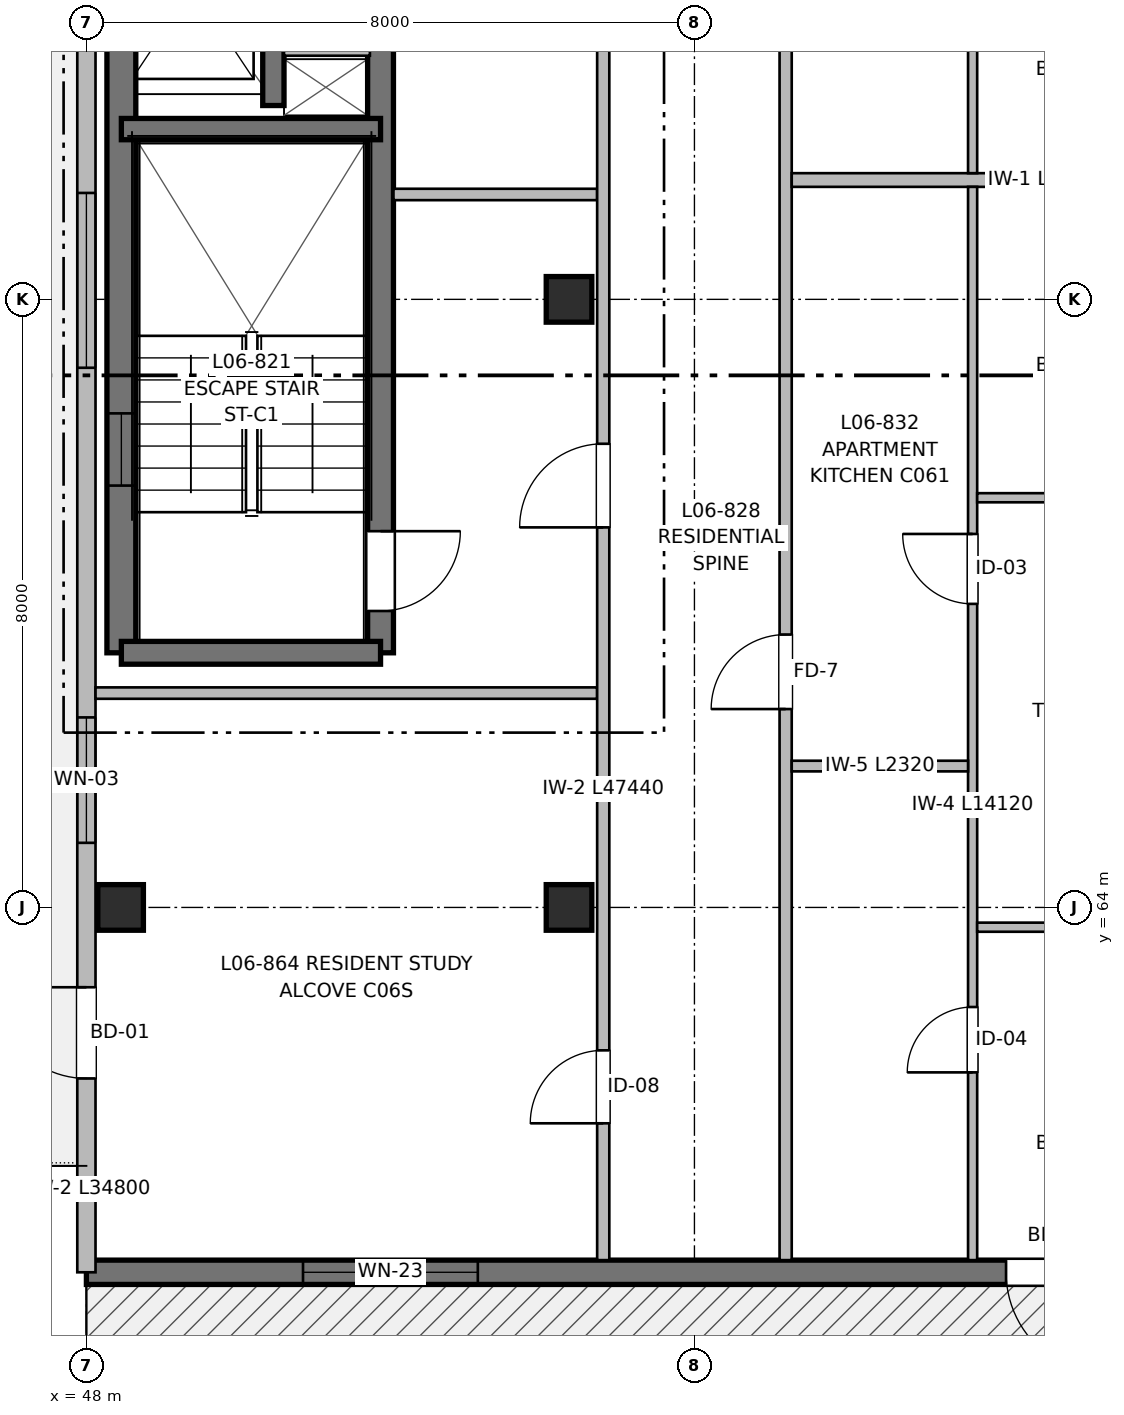
"""IFC4 building model, lengths in metres.
Left out: names, types, materials, properties, quantities, classifications, styles, units other than length and angle.
Written with IfcOpenShell. Run it as: python <this file> out.ifc"""

import sys

from ifc_helpers import new_model, si_unit, direction, frame, frame_2d, origin, origin_2d, place, context, subcontext, project, spatial, rectangle, extrude, element, fill, save


model = new_model("IFC4")
c1 = context("Model", 3, precision=1e-05, world=origin(), true_north=direction((0.0, 1.0)))
c2 = subcontext(c1, "Body", "Model", "MODEL_VIEW")
j1 = project(units=[si_unit("LENGTHUNIT", "METRE"), si_unit("PLANEANGLEUNIT", "RADIAN")], contexts=[c1])
p1 = place(None, origin())
s1 = spatial("IfcSite", under=j1, at=p1, CompositionType="ELEMENT")
p2 = place(p1, origin())
s2 = spatial("IfcBuilding", under=s1, at=p2, CompositionType="ELEMENT")
p3 = place(p2, frame((0.0, 0.0, 20.16)))
s3 = spatial("IfcBuildingStorey", under=s2, at=p3, CompositionType="ELEMENT", Elevation=20.16)
for number, where, z_axis, x_axis in (
    (1, (48.45, 64.0, 0.0), (0.0, 0.0, 1.0), (1.0, 0.0, 0.0)),
    (2, (54.35, 64.0, 0.0), (0.0, 0.0, 1.0), (1.0, 0.0, 0.0)),
    (3, (54.35, 72.0, 0.0), (0.0, 0.0, 1.0), (1.0, 0.0, 0.0)),
):
    element("IfcColumn", number, at=place(p3, frame(where, z_axis=z_axis, x_axis=x_axis)), inside=s3, PredefinedType="COLUMN", context=c2, shape_type="SweptSolid", body=[
        extrude(rectangle(XDim=0.6, YDim=0.6, at=origin_2d()), origin(), (0.0, 0.0, 1.0), 3.2),
    ])
p4 = place(p3, frame((48.46, 67.35, 0.0), z_axis=(0.0, 0.0, 1.0), x_axis=(0.0, 1.0, 0.0)))
e4 = element("IfcWall", 4, at=p4, inside=s3, PredefinedType="SHEAR", context=c2, shape_type="SweptSolid", body=[
    extrude(rectangle(XDim=12.45, YDim=0.38, at=frame_2d((6.225, 0.0))), origin(), (0.0, 0.0, 1.0), 3.2),
])
p5 = place(p4, frame((2.2, 0.0, 0.97)))
e5 = element("IfcOpeningElement", 5, at=p5, cuts=e4, PredefinedType="OPENING", context=c2, shape_type="SweptSolid", body=[
    extrude(rectangle(XDim=0.95, YDim=1.25, at=frame_2d((0.475, 0.625))), frame((0.0, 0.2, 0.0), z_axis=(0.0, -1.0, 0.0), x_axis=(1.0, 0.0, 0.0)), (0.0, 0.0, 1.0), 0.4),
])
p6 = place(p3, frame((51.87, 79.8, 0.0), z_axis=(0.0, 0.0, 1.0), x_axis=(0.0, -1.0, 0.0)))
e6 = element("IfcWall", 6, at=p6, inside=s3, PredefinedType="SHEAR", context=c2, shape_type="SweptSolid", body=[
    extrude(rectangle(XDim=12.45, YDim=0.34, at=frame_2d((6.225, 0.0))), origin(), (0.0, 0.0, 1.0), 3.2),
])
p7 = place(p6, frame((10.85, 0.0, 0.0)))
e7 = element("IfcOpeningElement", 7, at=p7, cuts=e6, PredefinedType="OPENING", context=c2, shape_type="SweptSolid", body=[
    extrude(rectangle(XDim=1.05, YDim=2.15, at=frame_2d((0.525, 1.075))), frame((0.0, 0.18, 0.0), z_axis=(0.0, -1.0, 0.0), x_axis=(1.0, 0.0, 0.0)), (0.0, 0.0, 1.0), 0.36),
])
p8 = place(p3, frame((51.87, 67.35, 0.0), z_axis=(0.0, 0.0, 1.0), x_axis=(-1.0, 0.0, 0.0)))
e8 = element("IfcWall", 8, at=p8, inside=s3, PredefinedType="SHEAR", context=c2, shape_type="SweptSolid", body=[
    extrude(rectangle(XDim=3.41, YDim=0.3, at=frame_2d((1.705, 0.0))), origin(), (0.0, 0.0, 1.0), 3.2),
])
p9 = place(p3, frame((48.46, 74.24, 0.0), z_axis=(0.0, 0.0, 1.0), x_axis=(1.0, 0.0, 0.0)))
e9 = element("IfcWall", 9, at=p9, inside=s3, PredefinedType="SHEAR", context=c2, shape_type="SweptSolid", body=[
    extrude(rectangle(XDim=3.41, YDim=0.28, at=frame_2d((1.705, 0.0))), origin(), (0.0, 0.0, 1.0), 3.2),
])
p10 = place(p3, frame((50.46, 74.55, 0.0), z_axis=(0.0, 0.0, 1.0), x_axis=(0.0, 1.0, 0.0)))
e10 = element("IfcWall", 10, at=p10, inside=s3, PredefinedType="SHEAR", context=c2, shape_type="SweptSolid", body=[
    extrude(rectangle(XDim=5.25, YDim=0.28, at=frame_2d((2.625, 0.0))), origin(), (0.0, 0.0, 1.0), 3.2),
])
p11 = place(p10, frame((1.15, 0.0, 0.0)))
e11 = element("IfcOpeningElement", 11, at=p11, cuts=e10, PredefinedType="OPENING", context=c2, shape_type="SweptSolid", body=[
    extrude(rectangle(XDim=1.0, YDim=2.15, at=frame_2d((0.5, 1.075))), frame((0.0, 0.15, 0.0), z_axis=(0.0, -1.0, 0.0), x_axis=(1.0, 0.0, 0.0)), (0.0, 0.0, 1.0), 0.3),
])
p12 = place(p10, frame((3.85, 0.0, 0.0)))
e12 = element("IfcOpeningElement", 12, at=p12, cuts=e10, PredefinedType="OPENING", context=c2, shape_type="SweptSolid", body=[
    extrude(rectangle(XDim=0.9, YDim=2.15, at=frame_2d((0.45, 1.075))), frame((0.0, 0.15, 0.0), z_axis=(0.0, -1.0, 0.0), x_axis=(1.0, 0.0, 0.0)), (0.0, 0.0, 1.0), 0.3),
])
p13 = place(p3, frame((50.6, 75.28, 0.0), z_axis=(0.0, 0.0, 1.0), x_axis=(1.0, 0.0, 0.0)))
e13 = element("IfcWall", 13, at=p13, inside=s3, PredefinedType="PARTITIONING", context=c2, shape_type="SweptSolid", body=[
    extrude(rectangle(XDim=1.13, YDim=0.15, at=frame_2d((0.565, 0.0))), origin(), (0.0, 0.0, 1.0), 2.95),
])
p14 = place(p3, frame((64.0, 59.2, 0.0), z_axis=(0.0, 0.0, 1.0), x_axis=(-1.0, 0.0, 0.0)))
e14 = element("IfcWall", 14, at=p14, inside=s3, PredefinedType="SHEAR", context=c2, shape_type="SweptSolid", body=[
    extrude(rectangle(XDim=16.0, YDim=0.32, at=frame_2d((8.0, 0.0))), origin(), (0.0, 0.0, 1.0), 2.98),
])
p15 = place(p14, frame((2.55, 0.0, 0.0)))
e15 = element("IfcOpeningElement", 15, at=p15, cuts=e14, PredefinedType="OPENING", context=c2, shape_type="SweptSolid", body=[
    extrude(rectangle(XDim=1.35, YDim=2.2, at=frame_2d((0.675, 1.1))), frame((0.0, 0.17, 0.0), z_axis=(0.0, -1.0, 0.0), x_axis=(1.0, 0.0, 0.0)), (0.0, 0.0, 1.0), 0.34),
])
p16 = place(p14, frame((10.85, 0.0, 0.57)))
e16 = element("IfcOpeningElement", 16, at=p16, cuts=e14, PredefinedType="OPENING", context=c2, shape_type="SweptSolid", body=[
    extrude(rectangle(XDim=2.3, YDim=1.65, at=frame_2d((1.15, 0.825))), frame((0.0, 0.17, 0.0), z_axis=(0.0, -1.0, 0.0), x_axis=(1.0, 0.0, 0.0)), (0.0, 0.0, 1.0), 0.34),
])
p17 = place(p3, frame((48.0, 59.2, 0.0), z_axis=(0.0, 0.0, 1.0), x_axis=(0.0, 1.0, 0.0)))
e17 = element("IfcWall", 17, at=p17, inside=s3, PredefinedType="SOLIDWALL", context=c2, shape_type="SweptSolid", body=[
    extrude(rectangle(XDim=34.8, YDim=0.24, at=frame_2d((17.4, 0.0))), origin(), (0.0, 0.0, 1.0), 2.98),
])
p18 = place(p17, frame((2.55, 0.0, 0.0)))
e18 = element("IfcOpeningElement", 18, at=p18, cuts=e17, PredefinedType="OPENING", context=c2, shape_type="SweptSolid", body=[
    extrude(rectangle(XDim=1.2, YDim=2.2, at=frame_2d((0.6, 1.1))), frame((0.0, 0.13, 0.0), z_axis=(0.0, -1.0, 0.0), x_axis=(1.0, 0.0, 0.0)), (0.0, 0.0, 1.0), 0.26),
])
p19 = place(p17, frame((5.65, 0.0, 0.77)))
e19 = element("IfcOpeningElement", 19, at=p19, cuts=e17, PredefinedType="OPENING", context=c2, shape_type="SweptSolid", body=[
    extrude(rectangle(XDim=1.65, YDim=1.45, at=frame_2d((0.825, 0.725))), frame((0.0, 0.13, 0.0), z_axis=(0.0, -1.0, 0.0), x_axis=(1.0, 0.0, 0.0)), (0.0, 0.0, 1.0), 0.26),
])
p20 = place(p17, frame((11.9, 0.0, 0.57)))
e20 = element("IfcOpeningElement", 20, at=p20, cuts=e17, PredefinedType="OPENING", context=c2, shape_type="SweptSolid", body=[
    extrude(rectangle(XDim=2.3, YDim=1.65, at=frame_2d((1.15, 0.825))), frame((0.0, 0.13, 0.0), z_axis=(0.0, -1.0, 0.0), x_axis=(1.0, 0.0, 0.0)), (0.0, 0.0, 1.0), 0.26),
])
p21 = place(p17, frame((21.025, 0.0, 0.77)))
e21 = element("IfcOpeningElement", 21, at=p21, cuts=e17, PredefinedType="OPENING", context=c2, shape_type="SweptSolid", body=[
    extrude(rectangle(XDim=1.45, YDim=1.45, at=frame_2d((0.725, 0.725))), frame((0.0, 0.13, 0.0), z_axis=(0.0, -1.0, 0.0), x_axis=(1.0, 0.0, 0.0)), (0.0, 0.0, 1.0), 0.26),
])
p22 = place(p17, frame((29.475, 0.0, 0.72)))
e22 = element("IfcOpeningElement", 22, at=p22, cuts=e17, PredefinedType="OPENING", context=c2, shape_type="SweptSolid", body=[
    extrude(rectangle(XDim=1.95, YDim=1.5, at=frame_2d((0.975, 0.75))), frame((0.0, 0.13, 0.0), z_axis=(0.0, -1.0, 0.0), x_axis=(1.0, 0.0, 0.0)), (0.0, 0.0, 1.0), 0.26),
])
p23 = place(p3, frame((48.12, 66.82, 0.0), z_axis=(0.0, 0.0, 1.0), x_axis=(1.0, 0.0, 0.0)))
e23 = element("IfcWall", 23, at=p23, inside=s3, PredefinedType="PARTITIONING", context=c2, shape_type="SweptSolid", body=[
    extrude(rectangle(XDim=6.6, YDim=0.15, at=frame_2d((3.3, 0.0))), origin(), (0.0, 0.0, 1.0), 2.935),
])
p24 = place(p3, frame((52.04, 73.38, 0.0), z_axis=(0.0, 0.0, 1.0), x_axis=(1.0, 0.0, 0.0)))
e24 = element("IfcWall", 24, at=p24, inside=s3, PredefinedType="PARTITIONING", context=c2, shape_type="SweptSolid", body=[
    extrude(rectangle(XDim=2.68, YDim=0.15, at=frame_2d((1.34, 0.0))), origin(), (0.0, 0.0, 1.0), 2.935),
])
p25 = place(p3, frame((54.8, 59.36, 0.0), z_axis=(0.0, 0.0, 1.0), x_axis=(0.0, 1.0, 0.0)))
e25 = element("IfcWall", 25, at=p25, inside=s3, PredefinedType="PARTITIONING", context=c2, shape_type="SweptSolid", body=[
    extrude(rectangle(XDim=47.44, YDim=0.16, at=frame_2d((23.72, 0.0))), origin(), (0.0, 0.0, 1.0), 2.935),
])
p26 = place(p25, frame((9.64, 0.0, 0.0)))
e26 = element("IfcOpeningElement", 26, at=p26, cuts=e25, PredefinedType="OPENING", context=c2, shape_type="SweptSolid", body=[
    extrude(rectangle(XDim=1.1, YDim=2.15, at=frame_2d((0.55, 1.075))), frame((0.0, 0.09, 0.0), z_axis=(0.0, -1.0, 0.0), x_axis=(1.0, 0.0, 0.0)), (0.0, 0.0, 1.0), 0.18),
])
p27 = place(p25, frame((16.04, 0.0, 0.0)))
e27 = element("IfcOpeningElement", 27, at=p27, cuts=e25, PredefinedType="OPENING", context=c2, shape_type="SweptSolid", body=[
    extrude(rectangle(XDim=1.6, YDim=2.15, at=frame_2d((0.8, 1.075))), frame((0.0, 0.09, 0.0), z_axis=(0.0, -1.0, 0.0), x_axis=(1.0, 0.0, 0.0)), (0.0, 0.0, 1.0), 0.18),
])
p28 = place(p25, frame((1.8, 0.0, 0.0)))
e28 = element("IfcOpeningElement", 28, at=p28, cuts=e25, PredefinedType="OPENING", context=c2, shape_type="SweptSolid", body=[
    extrude(rectangle(XDim=0.96, YDim=2.15, at=frame_2d((0.48, 1.075))), frame((0.0, 0.09, 0.0), z_axis=(0.0, -1.0, 0.0), x_axis=(1.0, 0.0, 0.0)), (0.0, 0.0, 1.0), 0.18),
])
p29 = place(p25, frame((29.645, 0.0, 0.0)))
e29 = element("IfcOpeningElement", 29, at=p29, cuts=e25, PredefinedType="OPENING", context=c2, shape_type="SweptSolid", body=[
    extrude(rectangle(XDim=0.98, YDim=2.15, at=frame_2d((0.49, 1.075))), frame((0.0, 0.09, 0.0), z_axis=(0.0, -1.0, 0.0), x_axis=(1.0, 0.0, 0.0)), (0.0, 0.0, 1.0), 0.18),
])
p30 = place(p25, frame((37.455, 0.0, 0.0)))
e30 = element("IfcOpeningElement", 30, at=p30, cuts=e25, PredefinedType="OPENING", context=c2, shape_type="SweptSolid", body=[
    extrude(rectangle(XDim=0.98, YDim=2.15, at=frame_2d((0.49, 1.075))), frame((0.0, 0.09, 0.0), z_axis=(0.0, -1.0, 0.0), x_axis=(1.0, 0.0, 0.0)), (0.0, 0.0, 1.0), 0.18),
])
p31 = place(p3, frame((57.2, 59.36, 0.0), z_axis=(0.0, 0.0, 1.0), x_axis=(0.0, 1.0, 0.0)))
e31 = element("IfcWall", 31, at=p31, inside=s3, PredefinedType="PARTITIONING", context=c2, shape_type="SweptSolid", body=[
    extrude(rectangle(XDim=47.44, YDim=0.16, at=frame_2d((23.72, 0.0))), origin(), (0.0, 0.0, 1.0), 2.935),
])
p32 = place(p31, frame((7.25, 0.0, 0.0)))
e32 = element("IfcOpeningElement", 32, at=p32, cuts=e31, PredefinedType="OPENING", context=c2, shape_type="SweptSolid", body=[
    extrude(rectangle(XDim=0.98, YDim=2.15, at=frame_2d((0.49, 1.075))), frame((0.0, 0.09, 0.0), z_axis=(0.0, -1.0, 0.0), x_axis=(1.0, 0.0, 0.0)), (0.0, 0.0, 1.0), 0.18),
])
p33 = place(p31, frame((21.07, 0.0, 0.0)))
e33 = element("IfcOpeningElement", 33, at=p33, cuts=e31, PredefinedType="OPENING", context=c2, shape_type="SweptSolid", body=[
    extrude(rectangle(XDim=0.98, YDim=2.15, at=frame_2d((0.49, 1.075))), frame((0.0, 0.09, 0.0), z_axis=(0.0, -1.0, 0.0), x_axis=(1.0, 0.0, 0.0)), (0.0, 0.0, 1.0), 0.18),
])
p34 = place(p31, frame((33.46, 0.0, 0.0)))
e34 = element("IfcOpeningElement", 34, at=p34, cuts=e31, PredefinedType="OPENING", context=c2, shape_type="SweptSolid", body=[
    extrude(rectangle(XDim=0.98, YDim=2.15, at=frame_2d((0.49, 1.075))), frame((0.0, 0.09, 0.0), z_axis=(0.0, -1.0, 0.0), x_axis=(1.0, 0.0, 0.0)), (0.0, 0.0, 1.0), 0.18),
])
p35 = place(p31, frame((43.56, 0.0, 0.0)))
e35 = element("IfcOpeningElement", 35, at=p35, cuts=e31, PredefinedType="OPENING", context=c2, shape_type="SweptSolid", body=[
    extrude(rectangle(XDim=0.98, YDim=2.15, at=frame_2d((0.49, 1.075))), frame((0.0, 0.09, 0.0), z_axis=(0.0, -1.0, 0.0), x_axis=(1.0, 0.0, 0.0)), (0.0, 0.0, 1.0), 0.18),
])
p36 = place(p3, frame((57.28, 73.57, 0.0), z_axis=(0.0, 0.0, 1.0), x_axis=(1.0, 0.0, 0.0)))
e36 = element("IfcWall", 36, at=p36, inside=s3, PredefinedType="PARTITIONING", context=c2, shape_type="SweptSolid", body=[
    extrude(rectangle(XDim=6.6, YDim=0.18, at=frame_2d((3.3, 0.0))), origin(), (0.0, 0.0, 1.0), 2.935),
])
p37 = place(p3, frame((59.66, 59.36, 0.0), z_axis=(0.0, 0.0, 1.0), x_axis=(0.0, 1.0, 0.0)))
e37 = element("IfcWall", 37, at=p37, inside=s3, PredefinedType="PARTITIONING", context=c2, shape_type="SweptSolid", body=[
    extrude(rectangle(XDim=14.12, YDim=0.12, at=frame_2d((7.06, 0.0))), origin(), (0.0, 0.0, 1.0), 2.935),
])
p38 = place(p37, frame((2.47, 0.0, 0.0)))
e38 = element("IfcOpeningElement", 38, at=p38, cuts=e37, PredefinedType="OPENING", context=c2, shape_type="SweptSolid", body=[
    extrude(rectangle(XDim=0.86, YDim=2.1, at=frame_2d((0.43, 1.05))), frame((0.0, 0.07, 0.0), z_axis=(0.0, -1.0, 0.0), x_axis=(1.0, 0.0, 0.0)), (0.0, 0.0, 1.0), 0.14),
])
p39 = place(p37, frame((8.634, 0.0, 0.0)))
e39 = element("IfcOpeningElement", 39, at=p39, cuts=e37, PredefinedType="OPENING", context=c2, shape_type="SweptSolid", body=[
    extrude(rectangle(XDim=0.92, YDim=2.1, at=frame_2d((0.46, 1.05))), frame((0.0, 0.07, 0.0), z_axis=(0.0, -1.0, 0.0), x_axis=(1.0, 0.0, 0.0)), (0.0, 0.0, 1.0), 0.14),
])
p40 = place(p3, frame((57.28, 65.86, 0.0), z_axis=(0.0, 0.0, 1.0), x_axis=(1.0, 0.0, 0.0)))
e40 = element("IfcWall", 40, at=p40, inside=s3, PredefinedType="PARTITIONING", context=c2, shape_type="SweptSolid", body=[
    extrude(rectangle(XDim=2.32, YDim=0.14, at=frame_2d((1.16, 0.0))), origin(), (0.0, 0.0, 1.0), 2.935),
])
p41 = place(p3, frame((59.72, 63.74, 0.0), z_axis=(0.0, 0.0, 1.0), x_axis=(1.0, 0.0, 0.0)))
e41 = element("IfcWall", 41, at=p41, inside=s3, PredefinedType="PARTITIONING", context=c2, shape_type="SweptSolid", body=[
    extrude(rectangle(XDim=4.16, YDim=0.12, at=frame_2d((2.08, 0.0))), origin(), (0.0, 0.0, 1.0), 2.935),
])
p42 = place(p41, frame((1.63, 0.0, 0.0)))
e42 = element("IfcOpeningElement", 42, at=p42, cuts=e41, PredefinedType="OPENING", context=c2, shape_type="SweptSolid", body=[
    extrude(rectangle(XDim=0.9, YDim=2.1, at=frame_2d((0.45, 1.05))), frame((0.0, 0.07, 0.0), z_axis=(0.0, -1.0, 0.0), x_axis=(1.0, 0.0, 0.0)), (0.0, 0.0, 1.0), 0.14),
])
p43 = place(p3, frame((59.72, 69.39, 0.0), z_axis=(0.0, 0.0, 1.0), x_axis=(1.0, 0.0, 0.0)))
e43 = element("IfcWall", 43, at=p43, inside=s3, PredefinedType="PARTITIONING", context=c2, shape_type="SweptSolid", body=[
    extrude(rectangle(XDim=4.16, YDim=0.12, at=frame_2d((2.08, 0.0))), origin(), (0.0, 0.0, 1.0), 2.935),
])
p44 = place(p43, frame((1.64, 0.0, 0.0)))
e44 = element("IfcOpeningElement", 44, at=p44, cuts=e43, PredefinedType="OPENING", context=c2, shape_type="SweptSolid", body=[
    extrude(rectangle(XDim=0.88, YDim=2.1, at=frame_2d((0.44, 1.05))), frame((0.0, 0.07, 0.0), z_axis=(0.0, -1.0, 0.0), x_axis=(1.0, 0.0, 0.0)), (0.0, 0.0, 1.0), 0.14),
])
p45 = place(p3, frame((59.66, 73.66, 0.0), z_axis=(0.0, 0.0, 1.0), x_axis=(0.0, 1.0, 0.0)))
e45 = element("IfcWall", 45, at=p45, inside=s3, PredefinedType="PARTITIONING", context=c2, shape_type="SweptSolid", body=[
    extrude(rectangle(XDim=13.08, YDim=0.12, at=frame_2d((6.54, 0.0))), origin(), (0.0, 0.0, 1.0), 2.935),
])
p46 = place(p45, frame((2.288, 0.0, 0.0)))
e46 = element("IfcOpeningElement", 46, at=p46, cuts=e45, PredefinedType="OPENING", context=c2, shape_type="SweptSolid", body=[
    extrude(rectangle(XDim=0.86, YDim=2.1, at=frame_2d((0.43, 1.05))), frame((0.0, 0.07, 0.0), z_axis=(0.0, -1.0, 0.0), x_axis=(1.0, 0.0, 0.0)), (0.0, 0.0, 1.0), 0.14),
])
p47 = place(p45, frame((7.997, 0.0, 0.0)))
e47 = element("IfcOpeningElement", 47, at=p47, cuts=e45, PredefinedType="OPENING", context=c2, shape_type="SweptSolid", body=[
    extrude(rectangle(XDim=0.92, YDim=2.1, at=frame_2d((0.46, 1.05))), frame((0.0, 0.07, 0.0), z_axis=(0.0, -1.0, 0.0), x_axis=(1.0, 0.0, 0.0)), (0.0, 0.0, 1.0), 0.14),
])
p48 = place(p7, origin())
e48 = element("IfcDoor", 48, at=p48, inside=s3, OperationType="SINGLE_SWING_LEFT", PredefinedType="DOOR", context=c2, shape_type="SweptSolid", body=[
    extrude(rectangle(XDim=1.05, YDim=2.15, at=frame_2d((0.525, 1.075))), frame((0.0, 0.025, 0.0), z_axis=(0.0, -1.0, 0.0), x_axis=(1.0, 0.0, 0.0)), (0.0, 0.0, 1.0), 0.05),
])
fill(e7, e48)
p49 = place(p5, origin())
e49 = element("IfcWindow", 49, at=p49, inside=s3, PartitioningType="SINGLE_PANEL", PredefinedType="WINDOW", context=c2, shape_type="SweptSolid", body=[
    extrude(rectangle(XDim=0.95, YDim=1.25, at=frame_2d((0.475, 0.625))), frame((0.0, 0.03, 0.0), z_axis=(0.0, -1.0, 0.0), x_axis=(1.0, 0.0, 0.0)), (0.0, 0.0, 1.0), 0.06),
])
fill(e5, e49)
p50 = place(p15, origin())
e50 = element("IfcDoor", 50, at=p50, inside=s3, OperationType="SINGLE_SWING_LEFT", PredefinedType="DOOR", context=c2, shape_type="SweptSolid", body=[
    extrude(rectangle(XDim=1.35, YDim=2.2, at=frame_2d((0.675, 1.1))), frame((0.0, 0.025, 0.0), z_axis=(0.0, -1.0, 0.0), x_axis=(1.0, 0.0, 0.0)), (0.0, 0.0, 1.0), 0.05),
])
fill(e15, e50)
p51 = place(p16, origin())
e51 = element("IfcWindow", 51, at=p51, inside=s3, PartitioningType="SINGLE_PANEL", PredefinedType="WINDOW", context=c2, shape_type="SweptSolid", body=[
    extrude(rectangle(XDim=2.3, YDim=1.65, at=frame_2d((1.15, 0.825))), frame((0.0, 0.03, 0.0), z_axis=(0.0, -1.0, 0.0), x_axis=(1.0, 0.0, 0.0)), (0.0, 0.0, 1.0), 0.06),
])
fill(e16, e51)
p52 = place(p18, origin())
e52 = element("IfcDoor", 52, at=p52, inside=s3, OperationType="SINGLE_SWING_RIGHT", PredefinedType="DOOR", context=c2, shape_type="SweptSolid", body=[
    extrude(rectangle(XDim=1.2, YDim=2.2, at=frame_2d((0.6, 1.1))), frame((0.0, 0.025, 0.0), z_axis=(0.0, -1.0, 0.0), x_axis=(1.0, 0.0, 0.0)), (0.0, 0.0, 1.0), 0.05),
])
fill(e18, e52)
p53 = place(p19, origin())
e53 = element("IfcWindow", 53, at=p53, inside=s3, PartitioningType="SINGLE_PANEL", PredefinedType="WINDOW", context=c2, shape_type="SweptSolid", body=[
    extrude(rectangle(XDim=1.65, YDim=1.45, at=frame_2d((0.825, 0.725))), frame((0.0, 0.03, 0.0), z_axis=(0.0, -1.0, 0.0), x_axis=(1.0, 0.0, 0.0)), (0.0, 0.0, 1.0), 0.06),
])
fill(e19, e53)
p54 = place(p20, origin())
e54 = element("IfcWindow", 54, at=p54, inside=s3, PartitioningType="SINGLE_PANEL", PredefinedType="WINDOW", context=c2, shape_type="SweptSolid", body=[
    extrude(rectangle(XDim=2.3, YDim=1.65, at=frame_2d((1.15, 0.825))), frame((0.0, 0.03, 0.0), z_axis=(0.0, -1.0, 0.0), x_axis=(1.0, 0.0, 0.0)), (0.0, 0.0, 1.0), 0.06),
])
fill(e20, e54)
p55 = place(p26, origin())
e55 = element("IfcDoor", 55, at=p55, inside=s3, OperationType="SINGLE_SWING_LEFT", PredefinedType="DOOR", context=c2, shape_type="SweptSolid", body=[
    extrude(rectangle(XDim=1.1, YDim=2.15, at=frame_2d((0.55, 1.075))), frame((0.0, 0.025, 0.0), z_axis=(0.0, -1.0, 0.0), x_axis=(1.0, 0.0, 0.0)), (0.0, 0.0, 1.0), 0.05),
])
fill(e26, e55)
p56 = place(p38, origin())
e56 = element("IfcDoor", 56, at=p56, inside=s3, OperationType="SINGLE_SWING_LEFT", PredefinedType="DOOR", context=c2, shape_type="SweptSolid", body=[
    extrude(rectangle(XDim=0.86, YDim=2.1, at=frame_2d((0.43, 1.05))), frame((0.0, 0.025, 0.0), z_axis=(0.0, -1.0, 0.0), x_axis=(1.0, 0.0, 0.0)), (0.0, 0.0, 1.0), 0.05),
])
fill(e38, e56)
p57 = place(p39, origin())
e57 = element("IfcDoor", 57, at=p57, inside=s3, OperationType="SINGLE_SWING_RIGHT", PredefinedType="DOOR", context=c2, shape_type="SweptSolid", body=[
    extrude(rectangle(XDim=0.92, YDim=2.1, at=frame_2d((0.46, 1.05))), frame((0.0, 0.025, 0.0), z_axis=(0.0, -1.0, 0.0), x_axis=(1.0, 0.0, 0.0)), (0.0, 0.0, 1.0), 0.05),
])
fill(e39, e57)
p58 = place(p32, origin())
e58 = element("IfcDoor", 58, at=p58, inside=s3, OperationType="SINGLE_SWING_LEFT", PredefinedType="DOOR", context=c2, shape_type="SweptSolid", body=[
    extrude(rectangle(XDim=0.98, YDim=2.15, at=frame_2d((0.49, 1.075))), frame((0.0, 0.025, 0.0), z_axis=(0.0, -1.0, 0.0), x_axis=(1.0, 0.0, 0.0)), (0.0, 0.0, 1.0), 0.05),
])
fill(e32, e58)
p59 = place(p28, origin())
e59 = element("IfcDoor", 59, at=p59, inside=s3, OperationType="SINGLE_SWING_LEFT", PredefinedType="DOOR", context=c2, shape_type="SweptSolid", body=[
    extrude(rectangle(XDim=0.96, YDim=2.15, at=frame_2d((0.48, 1.075))), frame((0.0, 0.025, 0.0), z_axis=(0.0, -1.0, 0.0), x_axis=(1.0, 0.0, 0.0)), (0.0, 0.0, 1.0), 0.05),
])
fill(e28, e59)
save(model, sys.argv[1])
